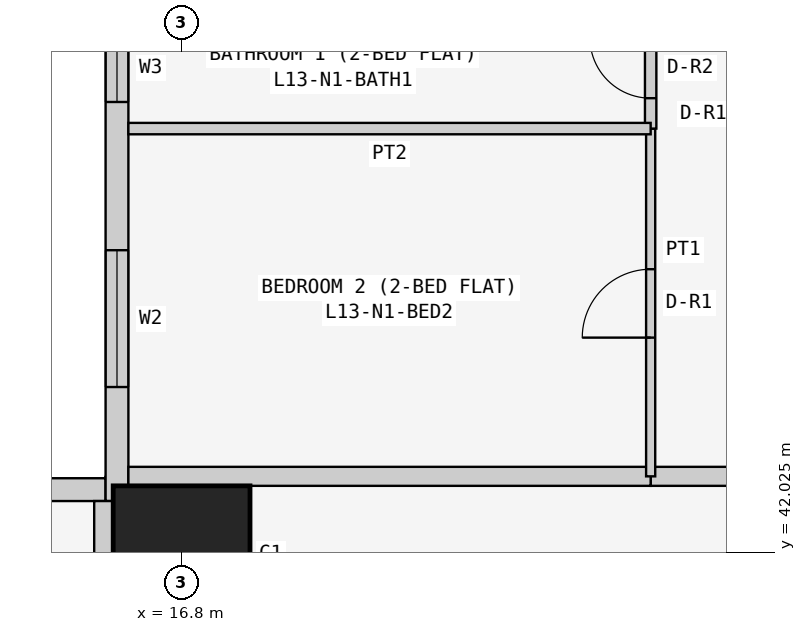
"""IFC4 building model, lengths in metres.
Left out: names, types, materials, properties, quantities, classifications, styles, units other than length and angle.
Written with IfcOpenShell. Run it as: python <this file> out.ifc"""

import sys

from ifc_helpers import new_model, si_unit, direction, frame, frame_2d, origin, origin_2d, place, context, subcontext, project, spatial, rectangle, extrude, element, fill, save


model = new_model("IFC4")
c1 = context("Model", 3, precision=1e-05, world=origin(), true_north=direction((0.0, 1.0)))
c2 = subcontext(c1, "Body", "Model", "MODEL_VIEW")
j1 = project(units=[si_unit("LENGTHUNIT", "METRE"), si_unit("PLANEANGLEUNIT", "RADIAN")], contexts=[c1])
p1 = place(None, origin())
s1 = spatial("IfcSite", under=j1, at=p1, CompositionType="ELEMENT")
p2 = place(p1, origin())
s2 = spatial("IfcBuilding", under=s1, at=p2, CompositionType="ELEMENT")
p3 = place(p2, frame((0.0, 0.0, 56.1)))
s3 = spatial("IfcBuildingStorey", under=s2, at=p3, CompositionType="ELEMENT", Elevation=56.1)
p4 = place(p3, frame((16.8, 42.0, 0.0), z_axis=(0.0, 0.0, 1.0), x_axis=(1.0, 0.0, 0.0)))
e1 = element("IfcColumn", 1, at=p4, inside=s3, PredefinedType="COLUMN", context=c2, shape_type="SweptSolid", body=[
    extrude(rectangle(XDim=1.8, YDim=1.8, at=origin_2d()), origin(), (0.0, 0.0, 1.0), 3.6),
])
p5 = place(p3, frame((15.8, 42.85, 0.0), z_axis=(0.0, 0.0, 1.0), x_axis=(-1.0, 0.0, 0.0)))
e2 = element("IfcWall", 2, at=p5, inside=s3, PredefinedType="SOLIDWALL", context=c2, shape_type="SweptSolid", body=[
    extrude(rectangle(XDim=15.4, YDim=0.3, at=frame_2d((7.7, 0.0))), origin(), (0.0, 0.0, 1.0), 3.45),
])
p6 = place(p5, frame((1.2, 0.0, 0.9)))
e3 = element("IfcOpeningElement", 3, at=p6, cuts=e2, PredefinedType="OPENING", context=c2, shape_type="SweptSolid", body=[
    extrude(rectangle(XDim=1.8, YDim=1.5, at=frame_2d((0.9, 0.75))), frame((0.0, 0.16, 0.0), z_axis=(0.0, -1.0, 0.0), x_axis=(1.0, 0.0, 0.0)), (0.0, 0.0, 1.0), 0.32),
])
p7 = place(p5, frame((4.95, 0.0, 1.5)))
e4 = element("IfcOpeningElement", 4, at=p7, cuts=e2, PredefinedType="OPENING", context=c2, shape_type="SweptSolid", body=[
    extrude(rectangle(XDim=0.9, YDim=0.7, at=frame_2d((0.45, 0.35))), frame((0.0, 0.16, 0.0), z_axis=(0.0, -1.0, 0.0), x_axis=(1.0, 0.0, 0.0)), (0.0, 0.0, 1.0), 0.32),
])
p8 = place(p5, frame((8.5, 0.0, 0.9)))
e5 = element("IfcOpeningElement", 5, at=p8, cuts=e2, PredefinedType="OPENING", context=c2, shape_type="SweptSolid", body=[
    extrude(rectangle(XDim=1.8, YDim=1.5, at=frame_2d((0.9, 0.75))), frame((0.0, 0.16, 0.0), z_axis=(0.0, -1.0, 0.0), x_axis=(1.0, 0.0, 0.0)), (0.0, 0.0, 1.0), 0.32),
])
p9 = place(p5, frame((12.5, 0.0, 0.0)))
e6 = element("IfcOpeningElement", 6, at=p9, cuts=e2, PredefinedType="OPENING", context=c2, shape_type="SweptSolid", body=[
    extrude(rectangle(XDim=0.9, YDim=2.4, at=frame_2d((0.45, 1.2))), frame((0.0, 0.16, 0.0), z_axis=(0.0, -1.0, 0.0), x_axis=(1.0, 0.0, 0.0)), (0.0, 0.0, 1.0), 0.32),
])
p10 = place(p5, frame((13.5, 0.0, 0.9)))
e7 = element("IfcOpeningElement", 7, at=p10, cuts=e2, PredefinedType="OPENING", context=c2, shape_type="SweptSolid", body=[
    extrude(rectangle(XDim=1.2, YDim=1.5, at=frame_2d((0.6, 0.75))), frame((0.0, 0.16, 0.0), z_axis=(0.0, -1.0, 0.0), x_axis=(1.0, 0.0, 0.0)), (0.0, 0.0, 1.0), 0.32),
])
p11 = place(p3, frame((15.95, 58.4, 0.0), z_axis=(0.0, 0.0, 1.0), x_axis=(0.0, -1.0, 0.0)))
e8 = element("IfcWall", 8, at=p11, inside=s3, PredefinedType="SOLIDWALL", context=c2, shape_type="SweptSolid", body=[
    extrude(rectangle(XDim=15.7, YDim=0.3, at=frame_2d((7.85, 0.0))), origin(), (0.0, 0.0, 1.0), 3.45),
])
p12 = place(p11, frame((12.4, 0.0, 0.9)))
e9 = element("IfcOpeningElement", 9, at=p12, cuts=e8, PredefinedType="OPENING", context=c2, shape_type="SweptSolid", body=[
    extrude(rectangle(XDim=1.8, YDim=1.5, at=frame_2d((0.9, 0.75))), frame((0.0, 0.16, 0.0), z_axis=(0.0, -1.0, 0.0), x_axis=(1.0, 0.0, 0.0)), (0.0, 0.0, 1.0), 0.32),
])
p13 = place(p11, frame((9.55, 0.0, 1.5)))
e10 = element("IfcOpeningElement", 10, at=p13, cuts=e8, PredefinedType="OPENING", context=c2, shape_type="SweptSolid", body=[
    extrude(rectangle(XDim=0.9, YDim=0.7, at=frame_2d((0.45, 0.35))), frame((0.0, 0.16, 0.0), z_axis=(0.0, -1.0, 0.0), x_axis=(1.0, 0.0, 0.0)), (0.0, 0.0, 1.0), 0.32),
])
p14 = place(p11, frame((5.1, 0.0, 0.9)))
e11 = element("IfcOpeningElement", 11, at=p14, cuts=e8, PredefinedType="OPENING", context=c2, shape_type="SweptSolid", body=[
    extrude(rectangle(XDim=1.8, YDim=1.5, at=frame_2d((0.9, 0.75))), frame((0.0, 0.16, 0.0), z_axis=(0.0, -1.0, 0.0), x_axis=(1.0, 0.0, 0.0)), (0.0, 0.0, 1.0), 0.32),
])
p15 = place(p11, frame((2.0, 0.0, 0.0)))
e12 = element("IfcOpeningElement", 12, at=p15, cuts=e8, PredefinedType="OPENING", context=c2, shape_type="SweptSolid", body=[
    extrude(rectangle(XDim=0.9, YDim=2.4, at=frame_2d((0.45, 1.2))), frame((0.0, 0.16, 0.0), z_axis=(0.0, -1.0, 0.0), x_axis=(1.0, 0.0, 0.0)), (0.0, 0.0, 1.0), 0.32),
])
p16 = place(p11, frame((0.7, 0.0, 0.9)))
e13 = element("IfcOpeningElement", 13, at=p16, cuts=e8, PredefinedType="OPENING", context=c2, shape_type="SweptSolid", body=[
    extrude(rectangle(XDim=1.2, YDim=1.5, at=frame_2d((0.6, 0.75))), frame((0.0, 0.16, 0.0), z_axis=(0.0, -1.0, 0.0), x_axis=(1.0, 0.0, 0.0)), (0.0, 0.0, 1.0), 0.32),
])
p17 = place(p3, frame((22.971, 43.025, 0.0), z_axis=(0.0, 0.0, 1.0), x_axis=(1.0, 0.0, 0.0)))
e14 = element("IfcWall", 14, at=p17, inside=s3, PredefinedType="PARTITIONING", context=c2, shape_type="SweptSolid", body=[
    extrude(rectangle(XDim=1.2, YDim=0.25, at=frame_2d((0.6, 0.0))), origin(), (0.0, 0.0, 1.0), 3.45),
])
for number, where, z_axis, x_axis in (
    (15, (16.1, 43.025, 0.0), (0.0, 0.0, 1.0), (1.0, 0.0, 0.0)),
    (16, (15.775, 35.829, 0.0), (0.0, 0.0, 1.0), (0.0, 1.0, 0.0)),
):
    element("IfcWall", number, at=place(p3, frame(where, z_axis=z_axis, x_axis=x_axis)), inside=s3, PredefinedType="PARTITIONING", context=c2, shape_type="SweptSolid", body=[
        extrude(rectangle(XDim=6.871, YDim=0.25, at=frame_2d((3.436, 0.0))), origin(), (0.0, 0.0, 1.0), 3.45),
    ])
p18 = place(p3, frame((22.971, 47.6, 0.0), z_axis=(0.0, 0.0, 1.0), x_axis=(0.0, -1.0, 0.0)))
e17 = element("IfcWall", 17, at=p18, inside=s3, PredefinedType="PARTITIONING", context=c2, shape_type="SweptSolid", body=[
    extrude(rectangle(XDim=4.575, YDim=0.12, at=frame_2d((2.288, 0.0))), origin(), (0.0, 0.0, 1.0), 3.45),
])
p19 = place(p18, frame((1.85, 0.0, 0.0)))
e18 = element("IfcOpeningElement", 18, at=p19, cuts=e17, PredefinedType="OPENING", context=c2, shape_type="SweptSolid", body=[
    extrude(rectangle(XDim=0.9, YDim=2.1, at=frame_2d((0.45, 1.05))), frame((0.0, 0.07, 0.0), z_axis=(0.0, -1.0, 0.0), x_axis=(1.0, 0.0, 0.0)), (0.0, 0.0, 1.0), 0.14),
])
p20 = place(p3, frame((22.971, 49.2, 0.0), z_axis=(0.0, 0.0, 1.0), x_axis=(0.0, -1.0, 0.0)))
e19 = element("IfcWall", 19, at=p20, inside=s3, PredefinedType="PARTITIONING", context=c2, shape_type="SweptSolid", body=[
    extrude(rectangle(XDim=1.6, YDim=0.15, at=frame_2d((0.8, 0.0))), origin(), (0.0, 0.0, 1.0), 3.45),
])
p21 = place(p20, frame((0.4, 0.0, 0.0)))
e20 = element("IfcOpeningElement", 20, at=p21, cuts=e19, PredefinedType="OPENING", context=c2, shape_type="SweptSolid", body=[
    extrude(rectangle(XDim=0.8, YDim=2.1, at=frame_2d((0.4, 1.05))), frame((0.0, 0.085, 0.0), z_axis=(0.0, -1.0, 0.0), x_axis=(1.0, 0.0, 0.0)), (0.0, 0.0, 1.0), 0.17),
])
p22 = place(p3, frame((22.971, 47.6, 0.0), z_axis=(0.0, 0.0, 1.0), x_axis=(-1.0, 0.0, 0.0)))
e21 = element("IfcWall", 21, at=p22, inside=s3, PredefinedType="PARTITIONING", context=c2, shape_type="SweptSolid", body=[
    extrude(rectangle(XDim=6.871, YDim=0.15, at=frame_2d((3.436, 0.0))), origin(), (0.0, 0.0, 1.0), 3.45),
])
p23 = place(p12, origin())
e22 = element("IfcWindow", 22, at=p23, inside=s3, PartitioningType="SINGLE_PANEL", PredefinedType="WINDOW", context=c2, shape_type="SweptSolid", body=[
    extrude(rectangle(XDim=1.8, YDim=1.5, at=frame_2d((0.9, 0.75))), frame((0.0, 0.03, 0.0), z_axis=(0.0, -1.0, 0.0), x_axis=(1.0, 0.0, 0.0)), (0.0, 0.0, 1.0), 0.06),
])
fill(e9, e22)
p24 = place(p13, origin())
e23 = element("IfcWindow", 23, at=p24, inside=s3, PartitioningType="SINGLE_PANEL", PredefinedType="WINDOW", context=c2, shape_type="SweptSolid", body=[
    extrude(rectangle(XDim=0.9, YDim=0.7, at=frame_2d((0.45, 0.35))), frame((0.0, 0.03, 0.0), z_axis=(0.0, -1.0, 0.0), x_axis=(1.0, 0.0, 0.0)), (0.0, 0.0, 1.0), 0.06),
])
fill(e10, e23)
p25 = place(p19, frame((0.9, 0.0, 0.0), z_axis=(0.0, 0.0, 1.0), x_axis=(-1.0, 0.0, 0.0)))
e24 = element("IfcDoor", 24, at=p25, inside=s3, OperationType="SINGLE_SWING_LEFT", PredefinedType="DOOR", context=c2, shape_type="SweptSolid", body=[
    extrude(rectangle(XDim=0.9, YDim=2.1, at=frame_2d((0.45, 1.05))), frame((0.0, 0.025, 0.0), z_axis=(0.0, -1.0, 0.0), x_axis=(1.0, 0.0, 0.0)), (0.0, 0.0, 1.0), 0.05),
])
fill(e18, e24)
p26 = place(p21, frame((0.8, 0.0, 0.0), z_axis=(0.0, 0.0, 1.0), x_axis=(-1.0, 0.0, 0.0)))
e25 = element("IfcDoor", 25, at=p26, inside=s3, OperationType="SINGLE_SWING_RIGHT", PredefinedType="DOOR", context=c2, shape_type="SweptSolid", body=[
    extrude(rectangle(XDim=0.8, YDim=2.1, at=frame_2d((0.4, 1.05))), frame((0.0, 0.025, 0.0), z_axis=(0.0, -1.0, 0.0), x_axis=(1.0, 0.0, 0.0)), (0.0, 0.0, 1.0), 0.05),
])
fill(e20, e25)
save(model, sys.argv[1])
